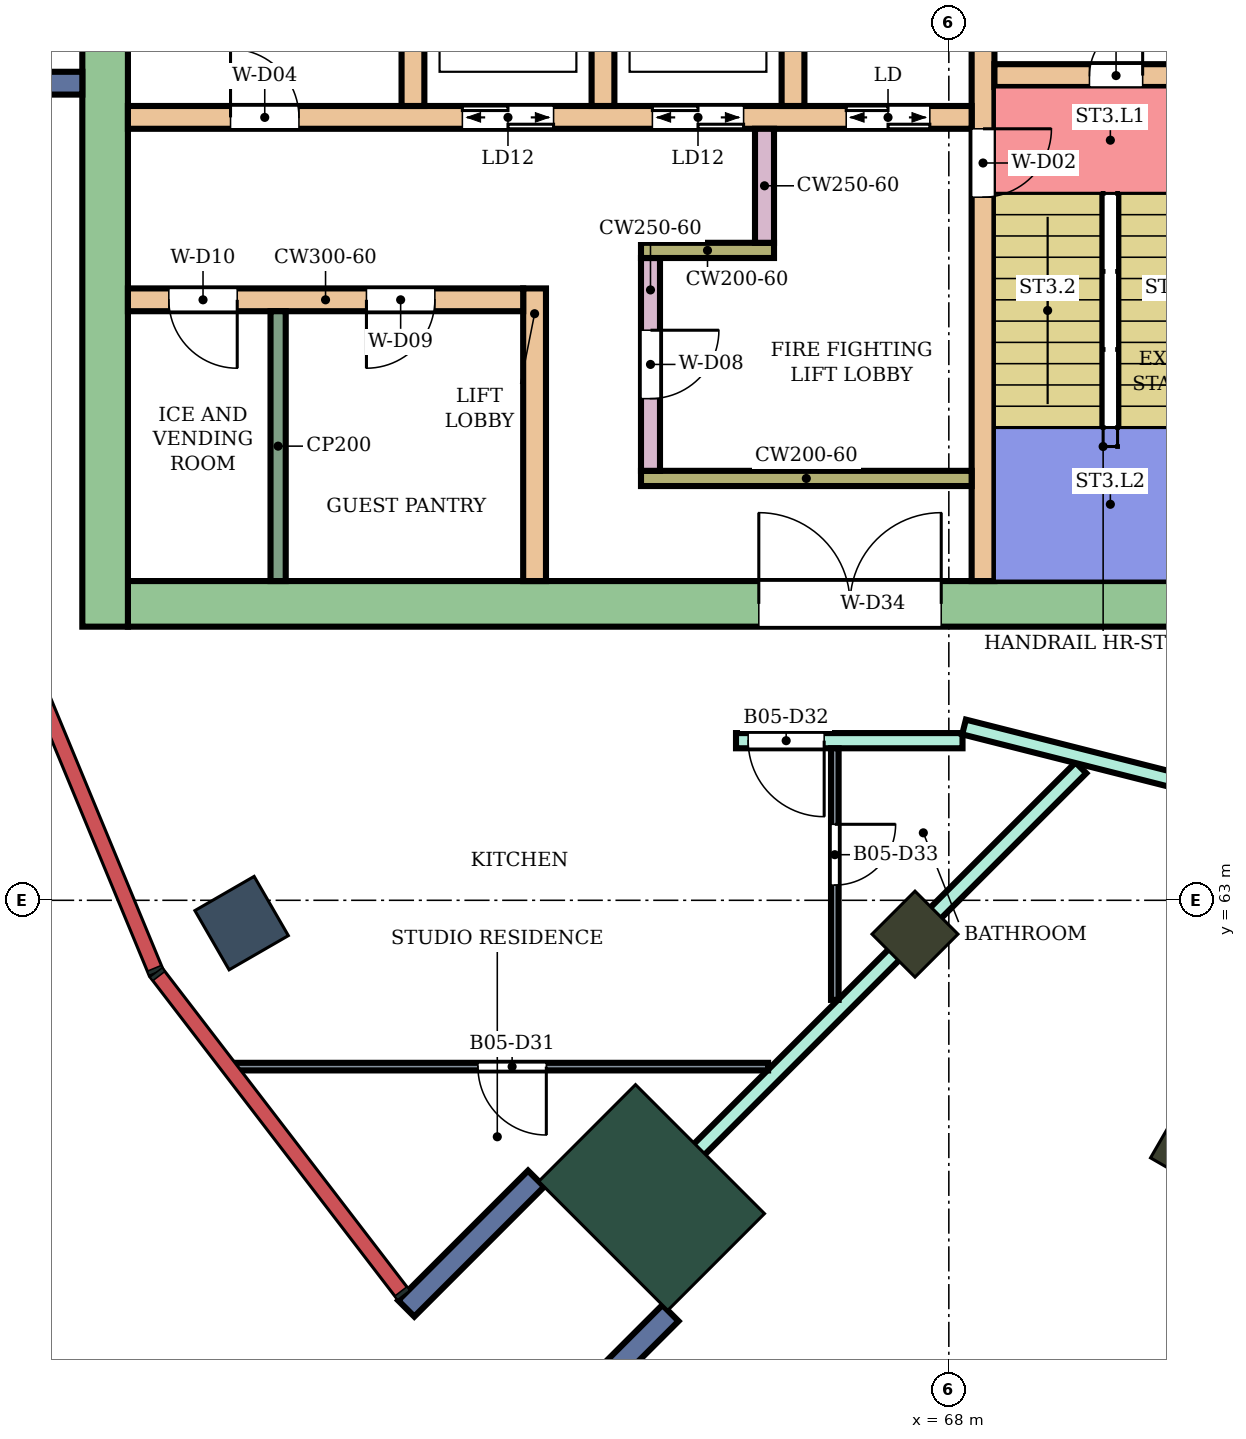
"""IFC4 building model, lengths in metres.
Left out: names, types, materials, properties, quantities, classifications, styles, units other than length and angle.
Written with IfcOpenShell. Run it as: python <this file> out.ifc"""

import sys

from ifc_helpers import new_model, si_unit, direction, frame, frame_2d, origin, origin_2d, place, context, subcontext, project, spatial, rectangle, extrude, element, fill, save


model = new_model("IFC4")
c1 = context("Model", 3, precision=1e-05, world=origin(), true_north=direction((0.0, 1.0)))
c2 = subcontext(c1, "Body", "Model", "MODEL_VIEW")
j1 = project(units=[si_unit("LENGTHUNIT", "METRE"), si_unit("PLANEANGLEUNIT", "RADIAN")], contexts=[c1])
p1 = place(None, origin())
s1 = spatial("IfcSite", under=j1, at=p1, CompositionType="ELEMENT")
p2 = place(p1, origin())
s2 = spatial("IfcBuilding", under=s1, at=p2, CompositionType="ELEMENT")
p3 = place(p2, frame((0.0, 0.0, 262.5)))
s3 = spatial("IfcBuildingStorey", under=s2, at=p3, CompositionType="ELEMENT", Elevation=262.5)
p4 = place(p3, frame((58.696, 62.7, 0.0), z_axis=(0.0, 0.0, 1.0), x_axis=(-0.866025403784, -0.5, 0.0)))
e1 = element("IfcColumn", 1, at=p4, inside=s3, PredefinedType="COLUMN", context=c2, shape_type="SweptSolid", body=[
    extrude(rectangle(XDim=0.9, YDim=0.9, at=origin_2d()), origin(), (0.0, 0.0, 1.0), 4.2),
])
for number, where, z_axis, x_axis in (
    (2, (67.555, 62.555, 0.0), (0.0, 0.0, 1.0), (-0.707, -0.707, 0.0)),
    (3, (71.2, 59.758, 0.0), (0.0, 0.0, 1.0), (-0.5, -0.866, 0.0)),
):
    element("IfcColumn", number, at=place(p3, frame(where, z_axis=z_axis, x_axis=x_axis)), inside=s3, PredefinedType="COLUMN", context=c2, shape_type="SweptSolid", body=[
        extrude(rectangle(XDim=0.8, YDim=0.8, at=origin_2d()), origin(), (0.0, 0.0, 1.0), 4.2),
    ])
p5 = place(p3, frame((64.09, 59.09, 0.0), z_axis=(0.0, 0.0, 1.0), x_axis=(-0.707106781187, -0.707106781187, 0.0)))
e4 = element("IfcColumn", 4, at=p5, inside=s3, PredefinedType="COLUMN", context=c2, shape_type="SweptSolid", body=[
    extrude(rectangle(XDim=1.8, YDim=2.4, at=origin_2d()), origin(), (0.0, 0.0, 1.0), 4.2),
])
p6 = place(p3, frame((72.1, 66.9, 0.0), z_axis=(0.0, 0.0, 1.0), x_axis=(-1.0, 0.0, 0.0)))
e5 = element("IfcWall", 5, at=p6, inside=s3, PredefinedType="SHEAR", context=c2, shape_type="SweptSolid", body=[
    extrude(rectangle(XDim=14.9, YDim=0.6, at=frame_2d((7.45, 0.0))), origin(), (0.0, 0.0, 1.0), 3.88),
])
p7 = place(p6, frame((4.2, 0.0, 0.0)))
e6 = element("IfcOpeningElement", 6, at=p7, cuts=e5, PredefinedType="OPENING", context=c2, shape_type="SweptSolid", body=[
    extrude(rectangle(XDim=2.4, YDim=2.4, at=frame_2d((1.2, 1.2))), frame((0.0, 0.31, 0.0), z_axis=(0.0, -1.0, 0.0), x_axis=(1.0, 0.0, 0.0)), (0.0, 0.0, 1.0), 0.62),
])
p8 = place(p3, frame((56.9, 83.4, 0.0), z_axis=(0.0, 0.0, 1.0), x_axis=(0.0, -1.0, 0.0)))
e7 = element("IfcWall", 7, at=p8, inside=s3, PredefinedType="SHEAR", context=c2, shape_type="SweptSolid", body=[
    extrude(rectangle(XDim=16.8, YDim=0.6, at=frame_2d((8.4, 0.0))), origin(), (0.0, 0.0, 1.0), 3.88),
])
p9 = place(p3, frame((68.45, 75.0, 0.0), z_axis=(0.0, 0.0, 1.0), x_axis=(0.0, -1.0, 0.0)))
e8 = element("IfcWall", 8, at=p9, inside=s3, PredefinedType="SHEAR", context=c2, shape_type="SweptSolid", body=[
    extrude(rectangle(XDim=7.8, YDim=0.3, at=frame_2d((3.9, 0.0))), origin(), (0.0, 0.0, 1.0), 3.88),
])
p10 = place(p9, frame((1.85, 0.0, 0.0)))
e9 = element("IfcOpeningElement", 9, at=p10, cuts=e8, PredefinedType="OPENING", context=c2, shape_type="SweptSolid", body=[
    extrude(rectangle(XDim=0.9, YDim=2.1, at=frame_2d((0.45, 1.05))), frame((0.0, 0.16, 0.0), z_axis=(0.0, -1.0, 0.0), x_axis=(1.0, 0.0, 0.0)), (0.0, 0.0, 1.0), 0.32),
])
p11 = place(p3, frame((71.65, 73.85, 0.0), z_axis=(0.0, 0.0, 1.0), x_axis=(-1.0, 0.0, 0.0)))
e10 = element("IfcWall", 10, at=p11, inside=s3, PredefinedType="SHEAR", context=c2, shape_type="SweptSolid", body=[
    extrude(rectangle(XDim=3.05, YDim=0.3, at=frame_2d((1.525, 0.0))), origin(), (0.0, 0.0, 1.0), 3.88),
])
p12 = place(p11, frame((1.1, 0.0, 0.0)))
e11 = element("IfcOpeningElement", 11, at=p12, cuts=e10, PredefinedType="OPENING", context=c2, shape_type="SweptSolid", body=[
    extrude(rectangle(XDim=0.7, YDim=2.0, at=frame_2d((0.35, 1.0))), frame((0.0, 0.16, 0.0), z_axis=(0.0, -1.0, 0.0), x_axis=(1.0, 0.0, 0.0)), (0.0, 0.0, 1.0), 0.32),
])
p13 = place(p3, frame((68.3, 73.3, 0.0), z_axis=(0.0, 0.0, 1.0), x_axis=(-1.0, 0.0, 0.0)))
e12 = element("IfcWall", 12, at=p13, inside=s3, PredefinedType="SHEAR", context=c2, shape_type="SweptSolid", body=[
    extrude(rectangle(XDim=11.1, YDim=0.3, at=frame_2d((5.55, 0.0))), origin(), (0.0, 0.0, 1.0), 3.88),
])
p14 = place(p13, frame((0.55, 0.0, 0.0)))
e13 = element("IfcOpeningElement", 13, at=p14, cuts=e12, PredefinedType="OPENING", context=c2, shape_type="SweptSolid", body=[
    extrude(rectangle(XDim=1.1, YDim=2.1, at=frame_2d((0.55, 1.05))), frame((0.0, 0.16, 0.0), z_axis=(0.0, -1.0, 0.0), x_axis=(1.0, 0.0, 0.0)), (0.0, 0.0, 1.0), 0.32),
])
p15 = place(p13, frame((3.0, 0.0, 0.0)))
e14 = element("IfcOpeningElement", 14, at=p15, cuts=e12, PredefinedType="OPENING", context=c2, shape_type="SweptSolid", body=[
    extrude(rectangle(XDim=1.2, YDim=2.1, at=frame_2d((0.6, 1.05))), frame((0.0, 0.16, 0.0), z_axis=(0.0, -1.0, 0.0), x_axis=(1.0, 0.0, 0.0)), (0.0, 0.0, 1.0), 0.32),
])
p16 = place(p13, frame((5.5, 0.0, 0.0)))
e15 = element("IfcOpeningElement", 15, at=p16, cuts=e12, PredefinedType="OPENING", context=c2, shape_type="SweptSolid", body=[
    extrude(rectangle(XDim=1.2, YDim=2.1, at=frame_2d((0.6, 1.05))), frame((0.0, 0.16, 0.0), z_axis=(0.0, -1.0, 0.0), x_axis=(1.0, 0.0, 0.0)), (0.0, 0.0, 1.0), 0.32),
])
p17 = place(p13, frame((8.85, 0.0, 0.0)))
e16 = element("IfcOpeningElement", 16, at=p17, cuts=e12, PredefinedType="OPENING", context=c2, shape_type="SweptSolid", body=[
    extrude(rectangle(XDim=0.9, YDim=2.1, at=frame_2d((0.45, 1.05))), frame((0.0, 0.16, 0.0), z_axis=(0.0, -1.0, 0.0), x_axis=(1.0, 0.0, 0.0)), (0.0, 0.0, 1.0), 0.32),
])
for number, where, z_axis, x_axis in (
    (17, (65.95, 76.0, 0.0), (0.0, 0.0, 1.0), (0.0, -1.0, 0.0)),
    (18, (63.45, 76.0, 0.0), (0.0, 0.0, 1.0), (0.0, -1.0, 0.0)),
    (19, (60.95, 76.0, 0.0), (0.0, 0.0, 1.0), (0.0, -1.0, 0.0)),
):
    element("IfcWall", number, at=place(p3, frame(where, z_axis=z_axis, x_axis=x_axis)), inside=s3, PredefinedType="SHEAR", context=c2, shape_type="SweptSolid", body=[
        extrude(rectangle(XDim=2.55, YDim=0.3, at=frame_2d((1.275, 0.0))), origin(), (0.0, 0.0, 1.0), 3.88),
    ])
p18 = place(p3, frame((68.3, 68.55, 0.0), z_axis=(0.0, 0.0, 1.0), x_axis=(-1.0, 0.0, 0.0)))
e20 = element("IfcWall", 20, at=p18, inside=s3, PredefinedType="SHEAR", context=c2, shape_type="SweptSolid", body=[
    extrude(rectangle(XDim=4.35, YDim=0.2, at=frame_2d((2.175, 0.0))), origin(), (0.0, 0.0, 1.0), 3.88),
])
p19 = place(p3, frame((64.075, 71.45, 0.0), z_axis=(0.0, 0.0, 1.0), x_axis=(0.0, -1.0, 0.0)))
e21 = element("IfcWall", 21, at=p19, inside=s3, PredefinedType="SHEAR", context=c2, shape_type="SweptSolid", body=[
    extrude(rectangle(XDim=2.8, YDim=0.25, at=frame_2d((1.4, 0.0))), origin(), (0.0, 0.0, 1.0), 3.88),
])
p20 = place(p19, frame((0.95, 0.0, 0.0)))
e22 = element("IfcOpeningElement", 22, at=p20, cuts=e21, PredefinedType="OPENING", context=c2, shape_type="SweptSolid", body=[
    extrude(rectangle(XDim=0.9, YDim=2.1, at=frame_2d((0.45, 1.05))), frame((0.0, 0.135, 0.0), z_axis=(0.0, -1.0, 0.0), x_axis=(1.0, 0.0, 0.0)), (0.0, 0.0, 1.0), 0.27),
])
p21 = place(p3, frame((65.7, 71.55, 0.0), z_axis=(0.0, 0.0, 1.0), x_axis=(-1.0, 0.0, 0.0)))
e23 = element("IfcWall", 23, at=p21, inside=s3, PredefinedType="SHEAR", context=c2, shape_type="SweptSolid", body=[
    extrude(rectangle(XDim=1.75, YDim=0.2, at=frame_2d((0.875, 0.0))), origin(), (0.0, 0.0, 1.0), 3.88),
])
p22 = place(p3, frame((65.575, 73.15, 0.0), z_axis=(0.0, 0.0, 1.0), x_axis=(0.0, -1.0, 0.0)))
e24 = element("IfcWall", 24, at=p22, inside=s3, PredefinedType="SHEAR", context=c2, shape_type="SweptSolid", body=[
    extrude(rectangle(XDim=1.5, YDim=0.25, at=frame_2d((0.75, 0.0))), origin(), (0.0, 0.0, 1.0), 3.88),
])
p23 = place(p3, frame((62.55, 71.05, 0.0), z_axis=(0.0, 0.0, 1.0), x_axis=(0.0, -1.0, 0.0)))
e25 = element("IfcWall", 25, at=p23, inside=s3, PredefinedType="SHEAR", context=c2, shape_type="SweptSolid", body=[
    extrude(rectangle(XDim=3.85, YDim=0.3, at=frame_2d((1.925, 0.0))), origin(), (0.0, 0.0, 1.0), 3.88),
])
p24 = place(p3, frame((62.4, 70.9, 0.0), z_axis=(0.0, 0.0, 1.0), x_axis=(-1.0, 0.0, 0.0)))
e26 = element("IfcWall", 26, at=p24, inside=s3, PredefinedType="SHEAR", context=c2, shape_type="SweptSolid", body=[
    extrude(rectangle(XDim=5.2, YDim=0.3, at=frame_2d((2.6, 0.0))), origin(), (0.0, 0.0, 1.0), 3.88),
])
p25 = place(p24, frame((1.162, 0.0, 0.0)))
e27 = element("IfcOpeningElement", 27, at=p25, cuts=e26, PredefinedType="OPENING", context=c2, shape_type="SweptSolid", body=[
    extrude(rectangle(XDim=0.9, YDim=2.1, at=frame_2d((0.45, 1.05))), frame((0.0, 0.16, 0.0), z_axis=(0.0, -1.0, 0.0), x_axis=(1.0, 0.0, 0.0)), (0.0, 0.0, 1.0), 0.32),
])
p26 = place(p24, frame((3.762, 0.0, 0.0)))
e28 = element("IfcOpeningElement", 28, at=p26, cuts=e26, PredefinedType="OPENING", context=c2, shape_type="SweptSolid", body=[
    extrude(rectangle(XDim=0.9, YDim=2.1, at=frame_2d((0.45, 1.05))), frame((0.0, 0.16, 0.0), z_axis=(0.0, -1.0, 0.0), x_axis=(1.0, 0.0, 0.0)), (0.0, 0.0, 1.0), 0.32),
])
for number, where, z_axis, x_axis in (
    (29, (56.6, 73.75, 0.0), (0.0, 0.0, 1.0), (-1.0, 0.0, 0.0)),
    (30, (62.57, 59.338, 0.0), (0.0, 0.0, 1.0), (-0.707, -0.707, 0.0)),
    (31, (64.338, 57.57, 0.0), (0.0, 0.0, 1.0), (-0.707, -0.707, 0.0)),
):
    element("IfcWall", number, at=place(p3, frame(where, z_axis=z_axis, x_axis=x_axis)), inside=s3, PredefinedType="NOTDEFINED", context=c2, shape_type="SweptSolid", body=[
        extrude(rectangle(XDim=2.416, YDim=0.3, at=frame_2d((1.208, 0.0))), origin(), (0.0, 0.0, 1.0), 4.2),
    ])
p27 = place(p3, frame((63.592, 58.6, 0.0), z_axis=(0.0, 0.0, 1.0), x_axis=(0.707261286313, 0.706952242293, 0.0)))
e32 = element("IfcWall", 32, at=p27, inside=s3, PredefinedType="PARTITIONING", context=c2, shape_type="SweptSolid", body=[
    extrude(rectangle(XDim=8.69, YDim=0.2, at=frame_2d((4.345, 0.0))), origin(), (0.0, 0.0, 1.0), 3.75),
])
p28 = place(p3, frame((65.2, 65.1, 0.0), z_axis=(0.0, 0.0, 1.0), x_axis=(1.0, 0.0, 0.0)))
e33 = element("IfcWall", 33, at=p28, inside=s3, PredefinedType="PARTITIONING", context=c2, shape_type="SweptSolid", body=[
    extrude(rectangle(XDim=2.98, YDim=0.2, at=frame_2d((1.49, 0.0))), origin(), (0.0, 0.0, 1.0), 3.75),
])
p29 = place(p28, frame((0.16, 0.0, 0.0)))
e34 = element("IfcOpeningElement", 34, at=p29, cuts=e33, PredefinedType="OPENING", context=c2, shape_type="SweptSolid", body=[
    extrude(rectangle(XDim=1.0, YDim=2.1, at=frame_2d((0.5, 1.05))), frame((0.0, 0.11, 0.0), z_axis=(0.0, -1.0, 0.0), x_axis=(1.0, 0.0, 0.0)), (0.0, 0.0, 1.0), 0.22),
])
p30 = place(p3, frame((68.2, 65.28, 0.0), z_axis=(0.0, 0.0, 1.0), x_axis=(0.969428528216, -0.245373854926, 0.0)))
e35 = element("IfcWall", 35, at=p30, inside=s3, PredefinedType="PARTITIONING", context=c2, shape_type="SweptSolid", body=[
    extrude(rectangle(XDim=5.928, YDim=0.2, at=frame_2d((2.964, 0.0))), origin(), (0.0, 0.0, 1.0), 3.75),
])
p31 = place(p30, frame((3.309, 0.0, 0.0)))
e36 = element("IfcOpeningElement", 36, at=p31, cuts=e35, PredefinedType="OPENING", context=c2, shape_type="SweptSolid", body=[
    extrude(rectangle(XDim=1.0, YDim=2.1, at=frame_2d((0.5, 1.05))), frame((0.0, 0.11, 0.0), z_axis=(0.0, -1.0, 0.0), x_axis=(1.0, 0.0, 0.0)), (0.0, 0.0, 1.0), 0.22),
])
p32 = place(p3, frame((58.6, 60.812, 0.0), z_axis=(0.0, 0.0, 1.0), x_axis=(1.0, 0.0, 0.0)))
e37 = element("IfcWall", 37, at=p32, inside=s3, PredefinedType="PARTITIONING", context=c2, shape_type="SweptSolid", body=[
    extrude(rectangle(XDim=7.022, YDim=0.1, at=frame_2d((3.511, 0.0))), origin(), (0.0, 0.0, 1.0), 3.75),
])
p33 = place(p32, frame((3.205, 0.0, 0.0)))
e38 = element("IfcOpeningElement", 38, at=p33, cuts=e37, PredefinedType="OPENING", context=c2, shape_type="SweptSolid", body=[
    extrude(rectangle(XDim=0.9, YDim=2.1, at=frame_2d((0.45, 1.05))), frame((0.0, 0.06, 0.0), z_axis=(0.0, -1.0, 0.0), x_axis=(1.0, 0.0, 0.0)), (0.0, 0.0, 1.0), 0.12),
])
p34 = place(p3, frame((66.5, 61.69, 0.0), z_axis=(0.0, 0.0, 1.0), x_axis=(0.0, 1.0, 0.0)))
e39 = element("IfcWall", 39, at=p34, inside=s3, PredefinedType="PARTITIONING", context=c2, shape_type="SweptSolid", body=[
    extrude(rectangle(XDim=3.31, YDim=0.1, at=frame_2d((1.655, 0.0))), origin(), (0.0, 0.0, 1.0), 3.75),
])
p35 = place(p34, frame((1.51, 0.0, 0.0)))
e40 = element("IfcOpeningElement", 40, at=p35, cuts=e39, PredefinedType="OPENING", context=c2, shape_type="SweptSolid", body=[
    extrude(rectangle(XDim=0.8, YDim=2.1, at=frame_2d((0.4, 1.05))), frame((0.0, 0.06, 0.0), z_axis=(0.0, -1.0, 0.0), x_axis=(1.0, 0.0, 0.0)), (0.0, 0.0, 1.0), 0.12),
])
p36 = place(p3, frame((59.176, 70.75, 0.0), z_axis=(0.0, 0.0, 1.0), x_axis=(0.0, -1.0, 0.0)))
e41 = element("IfcWall", 41, at=p36, inside=s3, PredefinedType="PARTITIONING", context=c2, shape_type="SweptSolid", body=[
    extrude(rectangle(XDim=3.55, YDim=0.2, at=frame_2d((1.775, 0.0))), origin(), (0.0, 0.0, 1.0), 3.88),
])
p37 = place(p33, frame((0.9, 0.0, 0.0), z_axis=(0.0, 0.0, 1.0), x_axis=(-1.0, 0.0, 0.0)))
e42 = element("IfcDoor", 42, at=p37, inside=s3, OperationType="SINGLE_SWING_LEFT", PredefinedType="DOOR", context=c2, shape_type="SweptSolid", body=[
    extrude(rectangle(XDim=0.9, YDim=2.1, at=frame_2d((0.45, 1.05))), frame((0.0, 0.025, 0.0), z_axis=(0.0, -1.0, 0.0), x_axis=(1.0, 0.0, 0.0)), (0.0, 0.0, 1.0), 0.05),
])
fill(e38, e42)
p38 = place(p29, frame((1.0, 0.0, 0.0), z_axis=(0.0, 0.0, 1.0), x_axis=(-1.0, 0.0, 0.0)))
e43 = element("IfcDoor", 43, at=p38, inside=s3, OperationType="SINGLE_SWING_LEFT", PredefinedType="DOOR", context=c2, shape_type="SweptSolid", body=[
    extrude(rectangle(XDim=1.0, YDim=2.1, at=frame_2d((0.5, 1.05))), frame((0.0, 0.025, 0.0), z_axis=(0.0, -1.0, 0.0), x_axis=(1.0, 0.0, 0.0)), (0.0, 0.0, 1.0), 0.05),
])
fill(e34, e43)
p39 = place(p35, frame((0.8, 0.0, 0.0), z_axis=(0.0, 0.0, 1.0), x_axis=(-1.0, 0.0, 0.0)))
e44 = element("IfcDoor", 44, at=p39, inside=s3, OperationType="SINGLE_SWING_LEFT", PredefinedType="DOOR", context=c2, shape_type="SweptSolid", body=[
    extrude(rectangle(XDim=0.8, YDim=2.1, at=frame_2d((0.4, 1.05))), frame((0.0, 0.025, 0.0), z_axis=(0.0, -1.0, 0.0), x_axis=(1.0, 0.0, 0.0)), (0.0, 0.0, 1.0), 0.05),
])
fill(e40, e44)
p40 = place(p12, frame((0.7, 0.0, 0.0), z_axis=(0.0, 0.0, 1.0), x_axis=(-1.0, 0.0, 0.0)))
e45 = element("IfcDoor", 45, at=p40, inside=s3, OperationType="SINGLE_SWING_RIGHT", PredefinedType="DOOR", context=c2, shape_type="SweptSolid", body=[
    extrude(rectangle(XDim=0.7, YDim=2.0, at=frame_2d((0.35, 1.0))), frame((0.0, 0.025, 0.0), z_axis=(0.0, -1.0, 0.0), x_axis=(1.0, 0.0, 0.0)), (0.0, 0.0, 1.0), 0.05),
])
fill(e11, e45)
p41 = place(p10, origin())
e46 = element("IfcDoor", 46, at=p41, inside=s3, OperationType="SINGLE_SWING_LEFT", PredefinedType="DOOR", context=c2, shape_type="SweptSolid", body=[
    extrude(rectangle(XDim=0.9, YDim=2.1, at=frame_2d((0.45, 1.05))), frame((0.0, 0.025, 0.0), z_axis=(0.0, -1.0, 0.0), x_axis=(1.0, 0.0, 0.0)), (0.0, 0.0, 1.0), 0.05),
])
fill(e9, e46)
p42 = place(p14, origin())
e47 = element("IfcDoor", 47, at=p42, inside=s3, OperationType="DOUBLE_DOOR_SLIDING", PredefinedType="DOOR", context=c2, shape_type="SweptSolid", body=[
    extrude(rectangle(XDim=1.1, YDim=2.1, at=frame_2d((0.55, 1.05))), frame((0.0, 0.025, 0.0), z_axis=(0.0, -1.0, 0.0), x_axis=(1.0, 0.0, 0.0)), (0.0, 0.0, 1.0), 0.05),
])
fill(e13, e47)
p43 = place(p15, origin())
e48 = element("IfcDoor", 48, at=p43, inside=s3, OperationType="DOUBLE_DOOR_SLIDING", PredefinedType="DOOR", context=c2, shape_type="SweptSolid", body=[
    extrude(rectangle(XDim=1.2, YDim=2.1, at=frame_2d((0.6, 1.05))), frame((0.0, 0.025, 0.0), z_axis=(0.0, -1.0, 0.0), x_axis=(1.0, 0.0, 0.0)), (0.0, 0.0, 1.0), 0.05),
])
fill(e14, e48)
p44 = place(p16, origin())
e49 = element("IfcDoor", 49, at=p44, inside=s3, OperationType="DOUBLE_DOOR_SLIDING", PredefinedType="DOOR", context=c2, shape_type="SweptSolid", body=[
    extrude(rectangle(XDim=1.2, YDim=2.1, at=frame_2d((0.6, 1.05))), frame((0.0, 0.025, 0.0), z_axis=(0.0, -1.0, 0.0), x_axis=(1.0, 0.0, 0.0)), (0.0, 0.0, 1.0), 0.05),
])
fill(e15, e49)
p45 = place(p17, frame((0.9, 0.0, 0.0), z_axis=(0.0, 0.0, 1.0), x_axis=(-1.0, 0.0, 0.0)))
e50 = element("IfcDoor", 50, at=p45, inside=s3, OperationType="SINGLE_SWING_LEFT", PredefinedType="DOOR", context=c2, shape_type="SweptSolid", body=[
    extrude(rectangle(XDim=0.9, YDim=2.1, at=frame_2d((0.45, 1.05))), frame((0.0, 0.025, 0.0), z_axis=(0.0, -1.0, 0.0), x_axis=(1.0, 0.0, 0.0)), (0.0, 0.0, 1.0), 0.05),
])
fill(e16, e50)
p46 = place(p20, origin())
e51 = element("IfcDoor", 51, at=p46, inside=s3, OperationType="SINGLE_SWING_LEFT", PredefinedType="DOOR", context=c2, shape_type="SweptSolid", body=[
    extrude(rectangle(XDim=0.9, YDim=2.1, at=frame_2d((0.45, 1.05))), frame((0.0, 0.025, 0.0), z_axis=(0.0, -1.0, 0.0), x_axis=(1.0, 0.0, 0.0)), (0.0, 0.0, 1.0), 0.05),
])
fill(e22, e51)
p47 = place(p25, origin())
e52 = element("IfcDoor", 52, at=p47, inside=s3, OperationType="SINGLE_SWING_RIGHT", PredefinedType="DOOR", context=c2, shape_type="SweptSolid", body=[
    extrude(rectangle(XDim=0.9, YDim=2.1, at=frame_2d((0.45, 1.05))), frame((0.0, 0.025, 0.0), z_axis=(0.0, -1.0, 0.0), x_axis=(1.0, 0.0, 0.0)), (0.0, 0.0, 1.0), 0.05),
])
fill(e27, e52)
p48 = place(p26, origin())
e53 = element("IfcDoor", 53, at=p48, inside=s3, OperationType="SINGLE_SWING_LEFT", PredefinedType="DOOR", context=c2, shape_type="SweptSolid", body=[
    extrude(rectangle(XDim=0.9, YDim=2.1, at=frame_2d((0.45, 1.05))), frame((0.0, 0.025, 0.0), z_axis=(0.0, -1.0, 0.0), x_axis=(1.0, 0.0, 0.0)), (0.0, 0.0, 1.0), 0.05),
])
fill(e28, e53)
p49 = place(p7, frame((2.4, 0.0, 0.0), z_axis=(0.0, 0.0, 1.0), x_axis=(-1.0, 0.0, 0.0)))
e54 = element("IfcDoor", 54, at=p49, inside=s3, OperationType="DOUBLE_DOOR_SINGLE_SWING", PredefinedType="DOOR", context=c2, shape_type="SweptSolid", body=[
    extrude(rectangle(XDim=2.4, YDim=2.4, at=frame_2d((1.2, 1.2))), frame((0.0, 0.025, 0.0), z_axis=(0.0, -1.0, 0.0), x_axis=(1.0, 0.0, 0.0)), (0.0, 0.0, 1.0), 0.05),
])
fill(e6, e54)
save(model, sys.argv[1])
